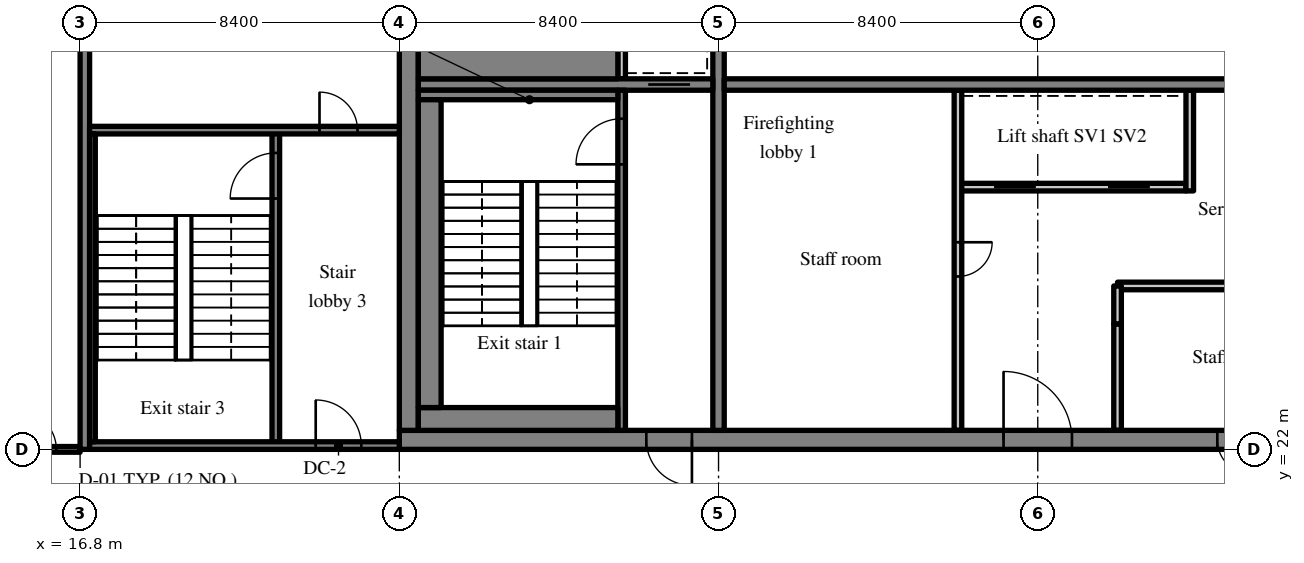
"""IFC4 building model, lengths in metres.
Left out: names, types, materials, properties, quantities, classifications, styles, units other than length and angle.
Written with IfcOpenShell. Run it as: python <this file> out.ifc"""

import sys

from ifc_helpers import new_model, si_unit, direction, frame, frame_2d, origin, place, context, subcontext, project, spatial, rectangle, extrude, source, transform, mapped, element, fill, save


model = new_model("IFC4")
c1 = context("Model", 3, precision=1e-05, world=origin(), true_north=direction((0.0, 1.0)))
c2 = subcontext(c1, "Body", "Model", "MODEL_VIEW")
j1 = project(units=[si_unit("LENGTHUNIT", "METRE"), si_unit("PLANEANGLEUNIT", "RADIAN")], contexts=[c1])
p1 = place(None, origin())
s1 = spatial("IfcSite", under=j1, at=p1, CompositionType="ELEMENT")
p2 = place(p1, origin())
s2 = spatial("IfcBuilding", under=s1, at=p2, CompositionType="ELEMENT")
p3 = place(p2, frame((0.0, 0.0, 285.7)))
s3 = spatial("IfcBuildingStorey", under=s2, at=p3, CompositionType="ELEMENT", Elevation=285.7)
m1 = source(origin(), c2, "Body", "SweptSolid", [
    extrude(rectangle(XDim=50.4, YDim=0.5, at=frame_2d((25.2, 0.0))), origin(), (0.0, 0.0, 1.0), 3.72),
])
p4 = place(p3, frame((25.2, 22.25, 0.0), z_axis=(0.0, 0.0, 1.0), x_axis=(1.0, 0.0, 0.0)))
e1 = element("IfcWall", 1, at=p4, inside=s3, PredefinedType="SHEAR", context=c2, shape_type="MappedRepresentation", body=[
    mapped(m1, transform((0.0, 0.0, 0.0), scale=1.0)),
])
m2 = source(origin(), c2, "Body", "SweptSolid", [
    extrude(rectangle(XDim=1.8, YDim=2.1, at=frame_2d((0.9, 1.05))), frame((0.0, 0.26, 0.0), z_axis=(0.0, -1.0, 0.0), x_axis=(1.0, 0.0, 0.0)), (0.0, 0.0, 1.0), 0.52),
])
p5 = place(p4, frame((15.9, 0.0, 0.0)))
e2 = element("IfcOpeningElement", 2, at=p5, cuts=e1, PredefinedType="OPENING", context=c2, shape_type="MappedRepresentation", body=[
    mapped(m2, transform((0.0, 0.0, 0.0), scale=1.0)),
])
m3 = source(origin(), c2, "Body", "SweptSolid", [
    extrude(rectangle(XDim=0.9, YDim=2.1, at=frame_2d((0.45, 1.05))), frame((0.0, 0.26, 0.0), z_axis=(0.0, -1.0, 0.0), x_axis=(1.0, 0.0, 0.0)), (0.0, 0.0, 1.0), 0.52),
])
p6 = place(p4, frame((21.525, 0.0, 0.0)))
e3 = element("IfcOpeningElement", 3, at=p6, cuts=e1, PredefinedType="OPENING", context=c2, shape_type="MappedRepresentation", body=[
    mapped(m3, transform((0.0, 0.0, 0.0), scale=1.0)),
])
p7 = place(p4, frame((32.7, 0.0, 0.0)))
e4 = element("IfcOpeningElement", 4, at=p7, cuts=e1, PredefinedType="OPENING", context=c2, shape_type="MappedRepresentation", body=[
    mapped(m2, transform((0.0, 0.0, 0.0), scale=1.0)),
])
m4 = source(origin(), c2, "Body", "SweptSolid", [
    extrude(rectangle(XDim=1.2, YDim=2.1, at=frame_2d((0.6, 1.05))), frame((0.0, 0.26, 0.0), z_axis=(0.0, -1.0, 0.0), x_axis=(1.0, 0.0, 0.0)), (0.0, 0.0, 1.0), 0.52),
])
p8 = place(p4, frame((6.5, 0.0, 0.0)))
e5 = element("IfcOpeningElement", 5, at=p8, cuts=e1, PredefinedType="OPENING", context=c2, shape_type="MappedRepresentation", body=[
    mapped(m4, transform((0.0, 0.0, 0.0), scale=1.0)),
])
p9 = place(p4, frame((47.975, 0.0, 0.0)))
e6 = element("IfcOpeningElement", 6, at=p9, cuts=e1, PredefinedType="OPENING", context=c2, shape_type="MappedRepresentation", body=[
    mapped(m4, transform((0.0, 0.0, 0.0), scale=1.0)),
])
m5 = source(origin(), c2, "Body", "SweptSolid", [
    extrude(rectangle(XDim=19.0, YDim=0.5, at=frame_2d((9.5, 0.0))), origin(), (0.0, 0.0, 1.0), 3.72),
])
p10 = place(p3, frame((25.45, 22.5, 0.0), z_axis=(0.0, 0.0, 1.0), x_axis=(0.0, 1.0, 0.0)))
e7 = element("IfcWall", 7, at=p10, inside=s3, PredefinedType="SHEAR", context=c2, shape_type="MappedRepresentation", body=[
    mapped(m5, transform((0.0, 0.0, 0.0), scale=1.0)),
])
m6 = source(origin(), c2, "Body", "SweptSolid", [
    extrude(rectangle(XDim=19.0, YDim=0.3, at=frame_2d((9.5, 0.0))), origin(), (0.0, 0.0, 1.0), 3.72),
])
p11 = place(p3, frame((33.6, 22.5, 0.0), z_axis=(0.0, 0.0, 1.0), x_axis=(0.0, 1.0, 0.0)))
e8 = element("IfcWall", 8, at=p11, inside=s3, PredefinedType="SHEAR", context=c2, shape_type="MappedRepresentation", body=[
    mapped(m6, transform((0.0, 0.0, 0.0), scale=1.0)),
])
m7 = source(origin(), c2, "Body", "SweptSolid", [
    extrude(rectangle(XDim=1.1, YDim=2.1, at=frame_2d((0.55, 1.05))), frame((0.0, 0.16, 0.0), z_axis=(0.0, -1.0, 0.0), x_axis=(1.0, 0.0, 0.0)), (0.0, 0.0, 1.0), 0.32),
])
p12 = place(p11, frame((12.95, 0.0, 0.0)))
e9 = element("IfcOpeningElement", 9, at=p12, cuts=e8, PredefinedType="OPENING", context=c2, shape_type="MappedRepresentation", body=[
    mapped(m7, transform((0.0, 0.0, 0.0), scale=1.0)),
])
m8 = source(origin(), c2, "Body", "SweptSolid", [
    extrude(rectangle(XDim=7.75, YDim=0.3, at=frame_2d((3.875, 0.0))), origin(), (0.0, 0.0, 1.0), 3.72),
])
p13 = place(p3, frame((25.7, 31.6, 0.0), z_axis=(0.0, 0.0, 1.0), x_axis=(1.0, 0.0, 0.0)))
e10 = element("IfcWall", 10, at=p13, inside=s3, PredefinedType="SHEAR", context=c2, shape_type="MappedRepresentation", body=[
    mapped(m8, transform((0.0, 0.0, 0.0), scale=1.0)),
])
p14 = place(p13, frame((6.05, 0.0, 0.0)))
e11 = element("IfcOpeningElement", 11, at=p14, cuts=e10, PredefinedType="OPENING", context=c2, shape_type="MappedRepresentation", body=[
    mapped(m7, transform((0.0, 0.0, 0.0), scale=1.0)),
])
m9 = source(origin(), c2, "Body", "SweptSolid", [
    extrude(rectangle(XDim=16.5, YDim=0.3, at=frame_2d((8.25, 0.0))), origin(), (0.0, 0.0, 1.0), 3.72),
])
p15 = place(p3, frame((33.75, 31.6, 0.0), z_axis=(0.0, 0.0, 1.0), x_axis=(1.0, 0.0, 0.0)))
e12 = element("IfcWall", 12, at=p15, inside=s3, PredefinedType="SHEAR", context=c2, shape_type="MappedRepresentation", body=[
    mapped(m9, transform((0.0, 0.0, 0.0), scale=1.0)),
])
m10 = source(origin(), c2, "Body", "SweptSolid", [
    extrude(rectangle(XDim=1.0, YDim=2.1, at=frame_2d((0.5, 1.05))), frame((0.0, 0.16, 0.0), z_axis=(0.0, -1.0, 0.0), x_axis=(1.0, 0.0, 0.0)), (0.0, 0.0, 1.0), 0.32),
])
p16 = place(p15, frame((14.875, 0.0, 0.0)))
e13 = element("IfcOpeningElement", 13, at=p16, cuts=e12, PredefinedType="OPENING", context=c2, shape_type="MappedRepresentation", body=[
    mapped(m10, transform((0.0, 0.0, 0.0), scale=1.0)),
])
m11 = source(origin(), c2, "Body", "SweptSolid", [
    extrude(rectangle(XDim=18.4, YDim=0.25, at=frame_2d((9.2, 0.0))), origin(), (0.0, 0.0, 1.0), 3.72),
])
p17 = place(p3, frame((16.925, 22.0, 0.0), z_axis=(0.0, 0.0, 1.0), x_axis=(0.0, 1.0, 0.0)))
e14 = element("IfcWall", 14, at=p17, inside=s3, PredefinedType="SHEAR", context=c2, shape_type="MappedRepresentation", body=[
    mapped(m11, transform((0.0, 0.0, 0.0), scale=1.0)),
])
m12 = source(origin(), c2, "Body", "SweptSolid", [
    extrude(rectangle(XDim=6.0, YDim=0.2, at=frame_2d((3.0, 0.0))), origin(), (0.0, 0.0, 1.0), 3.72),
])
p18 = place(p3, frame((39.9, 28.9, 0.0), z_axis=(0.0, 0.0, 1.0), x_axis=(1.0, 0.0, 0.0)))
e15 = element("IfcWall", 15, at=p18, inside=s3, PredefinedType="SOLIDWALL", context=c2, shape_type="MappedRepresentation", body=[
    mapped(m12, transform((0.0, 0.0, 0.0), scale=1.0)),
])
m13 = source(origin(), c2, "Body", "SweptSolid", [
    extrude(rectangle(XDim=1.1, YDim=2.1, at=frame_2d((0.55, 1.05))), frame((0.0, 0.11, 0.0), z_axis=(0.0, -1.0, 0.0), x_axis=(1.0, 0.0, 0.0)), (0.0, 0.0, 1.0), 0.22),
])
p19 = place(p18, frame((0.95, 0.0, 0.0)))
e16 = element("IfcOpeningElement", 16, at=p19, cuts=e15, PredefinedType="OPENING", context=c2, shape_type="MappedRepresentation", body=[
    mapped(m13, transform((0.0, 0.0, 0.0), scale=1.0)),
])
p20 = place(p18, frame((3.95, 0.0, 0.0)))
e17 = element("IfcOpeningElement", 17, at=p20, cuts=e15, PredefinedType="OPENING", context=c2, shape_type="MappedRepresentation", body=[
    mapped(m13, transform((0.0, 0.0, 0.0), scale=1.0)),
])
m14 = source(origin(), c2, "Body", "SweptSolid", [
    extrude(rectangle(XDim=8.95, YDim=0.2, at=frame_2d((4.475, 0.0))), origin(), (0.0, 0.0, 1.0), 3.72),
])
p21 = place(p3, frame((39.9, 22.5, 0.0), z_axis=(0.0, 0.0, 1.0), x_axis=(0.0, 1.0, 0.0)))
e18 = element("IfcWall", 18, at=p21, inside=s3, PredefinedType="PARTITIONING", context=c2, shape_type="MappedRepresentation", body=[
    mapped(m14, transform((0.0, 0.0, 0.0), scale=1.0)),
])
m15 = source(origin(), c2, "Body", "SweptSolid", [
    extrude(rectangle(XDim=0.9, YDim=2.1, at=frame_2d((0.45, 1.05))), frame((0.0, 0.11, 0.0), z_axis=(0.0, -1.0, 0.0), x_axis=(1.0, 0.0, 0.0)), (0.0, 0.0, 1.0), 0.22),
])
p22 = place(p21, frame((4.05, 0.0, 0.0)))
e19 = element("IfcOpeningElement", 19, at=p22, cuts=e18, PredefinedType="OPENING", context=c2, shape_type="MappedRepresentation", body=[
    mapped(m15, transform((0.0, 0.0, 0.0), scale=1.0)),
])
m16 = source(origin(), c2, "Body", "SweptSolid", [
    extrude(rectangle(XDim=2.8, YDim=0.2, at=frame_2d((1.4, 0.0))), origin(), (0.0, 0.0, 1.0), 3.72),
])
p23 = place(p3, frame((44.1, 22.5, 0.0), z_axis=(0.0, 0.0, 1.0), x_axis=(0.0, 1.0, 0.0)))
e20 = element("IfcWall", 20, at=p23, inside=s3, PredefinedType="PARTITIONING", context=c2, shape_type="MappedRepresentation", body=[
    mapped(m16, transform((0.0, 0.0, 0.0), scale=1.0)),
])
m17 = source(origin(), c2, "Body", "SweptSolid", [
    extrude(rectangle(XDim=2.65, YDim=0.2, at=frame_2d((1.325, 0.0))), origin(), (0.0, 0.0, 1.0), 3.72),
])
p24 = place(p3, frame((46.0, 28.8, 0.0), z_axis=(0.0, 0.0, 1.0), x_axis=(0.0, 1.0, 0.0)))
e21 = element("IfcWall", 21, at=p24, inside=s3, PredefinedType="SOLIDWALL", context=c2, shape_type="MappedRepresentation", body=[
    mapped(m17, transform((0.0, 0.0, 0.0), scale=1.0)),
])
m18 = source(origin(), c2, "Body", "SweptSolid", [
    extrude(rectangle(XDim=6.15, YDim=0.2, at=frame_2d((3.075, 0.0))), origin(), (0.0, 0.0, 1.0), 3.72),
])
p25 = place(p3, frame((44.1, 26.3, 0.0), z_axis=(0.0, 0.0, 1.0), x_axis=(1.0, 0.0, 0.0)))
e22 = element("IfcWall", 22, at=p25, inside=s3, PredefinedType="PARTITIONING", context=c2, shape_type="MappedRepresentation", body=[
    mapped(m18, transform((0.0, 0.0, 0.0), scale=1.0)),
])
m19 = source(origin(), c2, "Body", "SweptSolid", [
    extrude(rectangle(XDim=1.0, YDim=0.2, at=frame_2d((0.5, 0.0))), origin(), (0.0, 0.0, 1.0), 3.72),
])
p26 = place(p3, frame((44.1, 25.3, 0.0), z_axis=(0.0, 0.0, 1.0), x_axis=(0.0, 1.0, 0.0)))
e23 = element("IfcWall", 23, at=p26, inside=s3, PredefinedType="PARTITIONING", context=c2, shape_type="MappedRepresentation", body=[
    mapped(m19, transform((0.0, 0.0, 0.0), scale=1.0)),
])
m20 = source(origin(), c2, "Body", "SweptSolid", [
    extrude(rectangle(XDim=8.95, YDim=0.2, at=frame_2d((4.475, 0.0))), origin(), (0.0, 0.0, 1.0), 3.72),
])
p27 = place(p3, frame((31.05, 22.5, 0.0), z_axis=(0.0, 0.0, 1.0), x_axis=(0.0, 1.0, 0.0)))
e24 = element("IfcWall", 24, at=p27, inside=s3, PredefinedType="SOLIDWALL", context=c2, shape_type="MappedRepresentation", body=[
    mapped(m20, transform((0.0, 0.0, 0.0), scale=1.0)),
])
m21 = source(origin(), c2, "Body", "SweptSolid", [
    extrude(rectangle(XDim=1.2, YDim=2.1, at=frame_2d((0.6, 1.05))), frame((0.0, 0.11, 0.0), z_axis=(0.0, -1.0, 0.0), x_axis=(1.0, 0.0, 0.0)), (0.0, 0.0, 1.0), 0.22),
])
p28 = place(p27, frame((7.0, 0.0, 0.0)))
e25 = element("IfcOpeningElement", 25, at=p28, cuts=e24, PredefinedType="OPENING", context=c2, shape_type="MappedRepresentation", body=[
    mapped(m21, transform((0.0, 0.0, 0.0), scale=1.0)),
])
m22 = source(origin(), c2, "Body", "SweptSolid", [
    extrude(rectangle(XDim=1.85, YDim=0.2, at=frame_2d((0.925, 0.0))), origin(), (0.0, 0.0, 1.0), 3.72),
])
p29 = place(p3, frame((31.05, 31.75, 0.0), z_axis=(0.0, 0.0, 1.0), x_axis=(0.0, 1.0, 0.0)))
e26 = element("IfcWall", 26, at=p29, inside=s3, PredefinedType="SOLIDWALL", context=c2, shape_type="MappedRepresentation", body=[
    mapped(m22, transform((0.0, 0.0, 0.0), scale=1.0)),
])
m23 = source(origin(), c2, "Body", "SweptSolid", [
    extrude(rectangle(XDim=8.3, YDim=0.2, at=frame_2d((4.15, 0.0))), origin(), (0.0, 0.0, 1.0), 3.72),
])
p30 = place(p3, frame((21.95, 22.1, 0.0), z_axis=(0.0, 0.0, 1.0), x_axis=(0.0, 1.0, 0.0)))
e27 = element("IfcWall", 27, at=p30, inside=s3, PredefinedType="SOLIDWALL", context=c2, shape_type="MappedRepresentation", body=[
    mapped(m23, transform((0.0, 0.0, 0.0), scale=1.0)),
])
p31 = place(p30, frame((6.5, 0.0, 0.0)))
e28 = element("IfcOpeningElement", 28, at=p31, cuts=e27, PredefinedType="OPENING", context=c2, shape_type="MappedRepresentation", body=[
    mapped(m21, transform((0.0, 0.0, 0.0), scale=1.0)),
])
m24 = source(origin(), c2, "Body", "SweptSolid", [
    extrude(rectangle(XDim=8.15, YDim=0.2, at=frame_2d((4.075, 0.0))), origin(), (0.0, 0.0, 1.0), 3.72),
])
p32 = place(p3, frame((17.05, 22.1, 0.0), z_axis=(0.0, 0.0, 1.0), x_axis=(1.0, 0.0, 0.0)))
e29 = element("IfcWall", 29, at=p32, inside=s3, PredefinedType="SOLIDWALL", context=c2, shape_type="MappedRepresentation", body=[
    mapped(m24, transform((0.0, 0.0, 0.0), scale=1.0)),
])
p33 = place(p32, frame((5.95, 0.0, 0.0)))
e30 = element("IfcOpeningElement", 30, at=p33, cuts=e29, PredefinedType="OPENING", context=c2, shape_type="MappedRepresentation", body=[
    mapped(m21, transform((0.0, 0.0, 0.0), scale=1.0)),
])
p34 = place(p3, frame((17.05, 30.4, 0.0), z_axis=(0.0, 0.0, 1.0), x_axis=(1.0, 0.0, 0.0)))
e31 = element("IfcWall", 31, at=p34, inside=s3, PredefinedType="SOLIDWALL", context=c2, shape_type="MappedRepresentation", body=[
    mapped(m24, transform((0.0, 0.0, 0.0), scale=1.0)),
])
m25 = source(origin(), c2, "Body", "SweptSolid", [
    extrude(rectangle(XDim=1.0, YDim=2.1, at=frame_2d((0.5, 1.05))), frame((0.0, 0.11, 0.0), z_axis=(0.0, -1.0, 0.0), x_axis=(1.0, 0.0, 0.0)), (0.0, 0.0, 1.0), 0.22),
])
p35 = place(p34, frame((6.05, 0.0, 0.0)))
e32 = element("IfcOpeningElement", 32, at=p35, cuts=e31, PredefinedType="OPENING", context=c2, shape_type="MappedRepresentation", body=[
    mapped(m25, transform((0.0, 0.0, 0.0), scale=1.0)),
])
m26 = source(origin(), c2, "Body", "SweptSolid", [
    extrude(rectangle(XDim=5.25, YDim=0.6, at=frame_2d((2.625, 0.0))), origin(), (0.0, 0.0, 1.0), 3.72),
])
p36 = place(p3, frame((25.7, 22.8, 0.0), z_axis=(0.0, 0.0, 1.0), x_axis=(1.0, 0.0, 0.0)))
e33 = element("IfcWall", 33, at=p36, inside=s3, PredefinedType="SOLIDWALL", context=c2, shape_type="MappedRepresentation", body=[
    mapped(m26, transform((0.0, 0.0, 0.0), scale=1.0)),
])
m27 = source(origin(), c2, "Body", "SweptSolid", [
    extrude(rectangle(XDim=5.25, YDim=0.25, at=frame_2d((2.625, 0.0))), origin(), (0.0, 0.0, 1.0), 3.72),
])
p37 = place(p3, frame((25.7, 31.325, 0.0), z_axis=(0.0, 0.0, 1.0), x_axis=(1.0, 0.0, 0.0)))
e34 = element("IfcWall", 34, at=p37, inside=s3, PredefinedType="SOLIDWALL", context=c2, shape_type="MappedRepresentation", body=[
    mapped(m27, transform((0.0, 0.0, 0.0), scale=1.0)),
])
m28 = source(origin(), c2, "Body", "SweptSolid", [
    extrude(rectangle(XDim=8.1, YDim=0.6, at=frame_2d((4.05, 0.0))), origin(), (0.0, 0.0, 1.0), 3.72),
])
p38 = place(p3, frame((26.0, 23.1, 0.0), z_axis=(0.0, 0.0, 1.0), x_axis=(0.0, 1.0, 0.0)))
e35 = element("IfcWall", 35, at=p38, inside=s3, PredefinedType="SOLIDWALL", context=c2, shape_type="MappedRepresentation", body=[
    mapped(m28, transform((0.0, 0.0, 0.0), scale=1.0)),
])
m29 = source(origin(), c2, "Body", "SweptSolid", [
    extrude(rectangle(XDim=8.1, YDim=0.15, at=frame_2d((4.05, 0.0))), origin(), (0.0, 0.0, 1.0), 3.72),
])
p39 = place(p3, frame((17.125, 22.2, 0.0), z_axis=(0.0, 0.0, 1.0), x_axis=(0.0, 1.0, 0.0)))
e36 = element("IfcWall", 36, at=p39, inside=s3, PredefinedType="SOLIDWALL", context=c2, shape_type="MappedRepresentation", body=[
    mapped(m29, transform((0.0, 0.0, 0.0), scale=1.0)),
])
m30 = source(origin(), c2, "Body", "SweptSolid", [
    extrude(rectangle(XDim=5.25, YDim=1.05, at=frame_2d((2.625, 0.0))), origin(), (0.0, 0.0, 1.0), 3.72),
])
p40 = place(p3, frame((25.7, 32.275, 0.0), z_axis=(0.0, 0.0, 1.0), x_axis=(1.0, 0.0, 0.0)))
e37 = element("IfcWall", 37, at=p40, inside=s3, PredefinedType="SOLIDWALL", context=c2, shape_type="MappedRepresentation", body=[
    mapped(m30, transform((0.0, 0.0, 0.0), scale=1.0)),
])
m31 = source(origin(), c2, "Body", "SweptSolid", [
    extrude(rectangle(XDim=1.9, YDim=0.15, at=frame_2d((0.95, 0.0))), origin(), (0.0, 0.0, 1.0), 3.02),
])
p41 = place(p3, frame((14.9, 22.0, 0.0), z_axis=(0.0, 0.0, 1.0), x_axis=(1.0, 0.0, 0.0)))
e38 = element("IfcWall", 38, at=p41, inside=s3, PredefinedType="PARTITIONING", context=c2, shape_type="MappedRepresentation", body=[
    mapped(m31, transform((0.0, 0.0, 0.0), scale=1.0)),
])
m32 = source(origin(), c2, "Body", "SweptSolid", [
    extrude(rectangle(XDim=1.0, YDim=2.1, at=frame_2d((0.5, 1.05))), frame((0.0, 0.085, 0.0), z_axis=(0.0, -1.0, 0.0), x_axis=(1.0, 0.0, 0.0)), (0.0, 0.0, 1.0), 0.17),
])
p42 = place(p41, frame((0.275, 0.0, 0.0)))
e39 = element("IfcOpeningElement", 39, at=p42, cuts=e38, PredefinedType="OPENING", context=c2, shape_type="MappedRepresentation", body=[
    mapped(m32, transform((0.0, 0.0, 0.0), scale=1.0)),
])
m33 = source(origin(), c2, "Body", "SweptSolid", [
    extrude(rectangle(XDim=1.8, YDim=2.1, at=frame_2d((0.9, 1.05))), frame((0.0, 0.175, 0.0), z_axis=(0.0, -1.0, 0.0), x_axis=(1.0, 0.0, 0.0)), (0.0, 0.0, 1.0), 0.05),
])
p43 = place(p5, origin())
e40 = element("IfcDoor", 40, at=p43, inside=s3, OperationType="DOUBLE_DOOR_SINGLE_SWING", PredefinedType="DOOR", context=c2, shape_type="MappedRepresentation", body=[
    mapped(m33, transform((0.0, 0.0, 0.0), scale=1.0)),
])
fill(e2, e40)
m34 = source(origin(), c2, "Body", "SweptSolid", [
    extrude(rectangle(XDim=1.1, YDim=2.1, at=frame_2d((0.55, 1.05))), frame((0.0, 0.025, 0.0), z_axis=(0.0, -1.0, 0.0), x_axis=(1.0, 0.0, 0.0)), (0.0, 0.0, 1.0), 0.05),
])
p44 = place(p19, origin())
e41 = element("IfcDoor", 41, at=p44, inside=s3, OperationType="SLIDING_TO_LEFT", PredefinedType="DOOR", context=c2, shape_type="MappedRepresentation", body=[
    mapped(m34, transform((0.0, 0.0, 0.0), scale=1.0)),
])
fill(e16, e41)
p45 = place(p20, origin())
e42 = element("IfcDoor", 42, at=p45, inside=s3, OperationType="SLIDING_TO_RIGHT", PredefinedType="DOOR", context=c2, shape_type="MappedRepresentation", body=[
    mapped(m34, transform((0.0, 0.0, 0.0), scale=1.0)),
])
fill(e17, e42)
m35 = source(origin(), c2, "Body", "SweptSolid", [
    extrude(rectangle(XDim=0.9, YDim=2.1, at=frame_2d((0.45, 1.05))), frame((0.0, 0.025, 0.0), z_axis=(0.0, -1.0, 0.0), x_axis=(1.0, 0.0, 0.0)), (0.0, 0.0, 1.0), 0.05),
])
p46 = place(p22, origin())
e43 = element("IfcDoor", 43, at=p46, inside=s3, OperationType="SINGLE_SWING_RIGHT", PredefinedType="DOOR", context=c2, shape_type="MappedRepresentation", body=[
    mapped(m35, transform((0.0, 0.0, 0.0), scale=1.0)),
])
fill(e19, e43)
m36 = source(origin(), c2, "Body", "SweptSolid", [
    extrude(rectangle(XDim=0.9, YDim=2.1, at=frame_2d((0.45, 1.05))), frame((0.0, 0.175, 0.0), z_axis=(0.0, -1.0, 0.0), x_axis=(1.0, 0.0, 0.0)), (0.0, 0.0, 1.0), 0.05),
])
p47 = place(p6, origin())
e44 = element("IfcDoor", 44, at=p47, inside=s3, OperationType="SINGLE_SWING_RIGHT", PredefinedType="DOOR", context=c2, shape_type="MappedRepresentation", body=[
    mapped(m36, transform((0.0, 0.0, 0.0), scale=1.0)),
])
fill(e3, e44)
m37 = source(origin(), c2, "Body", "SweptSolid", [
    extrude(rectangle(XDim=1.2, YDim=2.1, at=frame_2d((0.6, 1.05))), frame((0.0, 0.025, 0.0), z_axis=(0.0, -1.0, 0.0), x_axis=(1.0, 0.0, 0.0)), (0.0, 0.0, 1.0), 0.05),
])
p48 = place(p28, origin())
e45 = element("IfcDoor", 45, at=p48, inside=s3, OperationType="SINGLE_SWING_LEFT", PredefinedType="DOOR", context=c2, shape_type="MappedRepresentation", body=[
    mapped(m37, transform((0.0, 0.0, 0.0), scale=1.0)),
])
fill(e25, e45)
m38 = source(origin(), c2, "Body", "SweptSolid", [
    extrude(rectangle(XDim=1.2, YDim=2.1, at=frame_2d((0.6, 1.05))), frame((0.0, 0.175, 0.0), z_axis=(0.0, -1.0, 0.0), x_axis=(1.0, 0.0, 0.0)), (0.0, 0.0, 1.0), 0.05),
])
p49 = place(p8, origin())
e46 = element("IfcDoor", 46, at=p49, inside=s3, OperationType="SINGLE_SWING_RIGHT", PredefinedType="DOOR", context=c2, shape_type="MappedRepresentation", body=[
    mapped(m38, transform((0.0, 0.0, 0.0), scale=1.0)),
])
fill(e5, e46)
p50 = place(p14, origin())
e47 = element("IfcDoor", 47, at=p50, inside=s3, OperationType="SLIDING_TO_RIGHT", PredefinedType="DOOR", context=c2, shape_type="MappedRepresentation", body=[
    mapped(m34, transform((0.0, 0.0, 0.0), scale=1.0)),
])
fill(e11, e47)
p51 = place(p31, origin())
e48 = element("IfcDoor", 48, at=p51, inside=s3, OperationType="SINGLE_SWING_LEFT", PredefinedType="DOOR", context=c2, shape_type="MappedRepresentation", body=[
    mapped(m37, transform((0.0, 0.0, 0.0), scale=1.0)),
])
fill(e28, e48)
p52 = place(p33, origin())
e49 = element("IfcDoor", 49, at=p52, inside=s3, OperationType="SINGLE_SWING_LEFT", PredefinedType="DOOR", context=c2, shape_type="MappedRepresentation", body=[
    mapped(m37, transform((0.0, 0.0, 0.0), scale=1.0)),
])
fill(e30, e49)
m39 = source(origin(), c2, "Body", "SweptSolid", [
    extrude(rectangle(XDim=1.0, YDim=2.1, at=frame_2d((0.5, 1.05))), frame((0.0, 0.025, 0.0), z_axis=(0.0, -1.0, 0.0), x_axis=(1.0, 0.0, 0.0)), (0.0, 0.0, 1.0), 0.05),
])
p53 = place(p35, origin())
e50 = element("IfcDoor", 50, at=p53, inside=s3, OperationType="SINGLE_SWING_LEFT", PredefinedType="DOOR", context=c2, shape_type="MappedRepresentation", body=[
    mapped(m39, transform((0.0, 0.0, 0.0), scale=1.0)),
])
fill(e32, e50)
p54 = place(p42, origin())
e51 = element("IfcDoor", 51, at=p54, inside=s3, OperationType="SINGLE_SWING_LEFT", PredefinedType="DOOR", context=c2, shape_type="MappedRepresentation", body=[
    mapped(m39, transform((0.0, 0.0, 0.0), scale=1.0)),
])
fill(e39, e51)
save(model, sys.argv[1])
